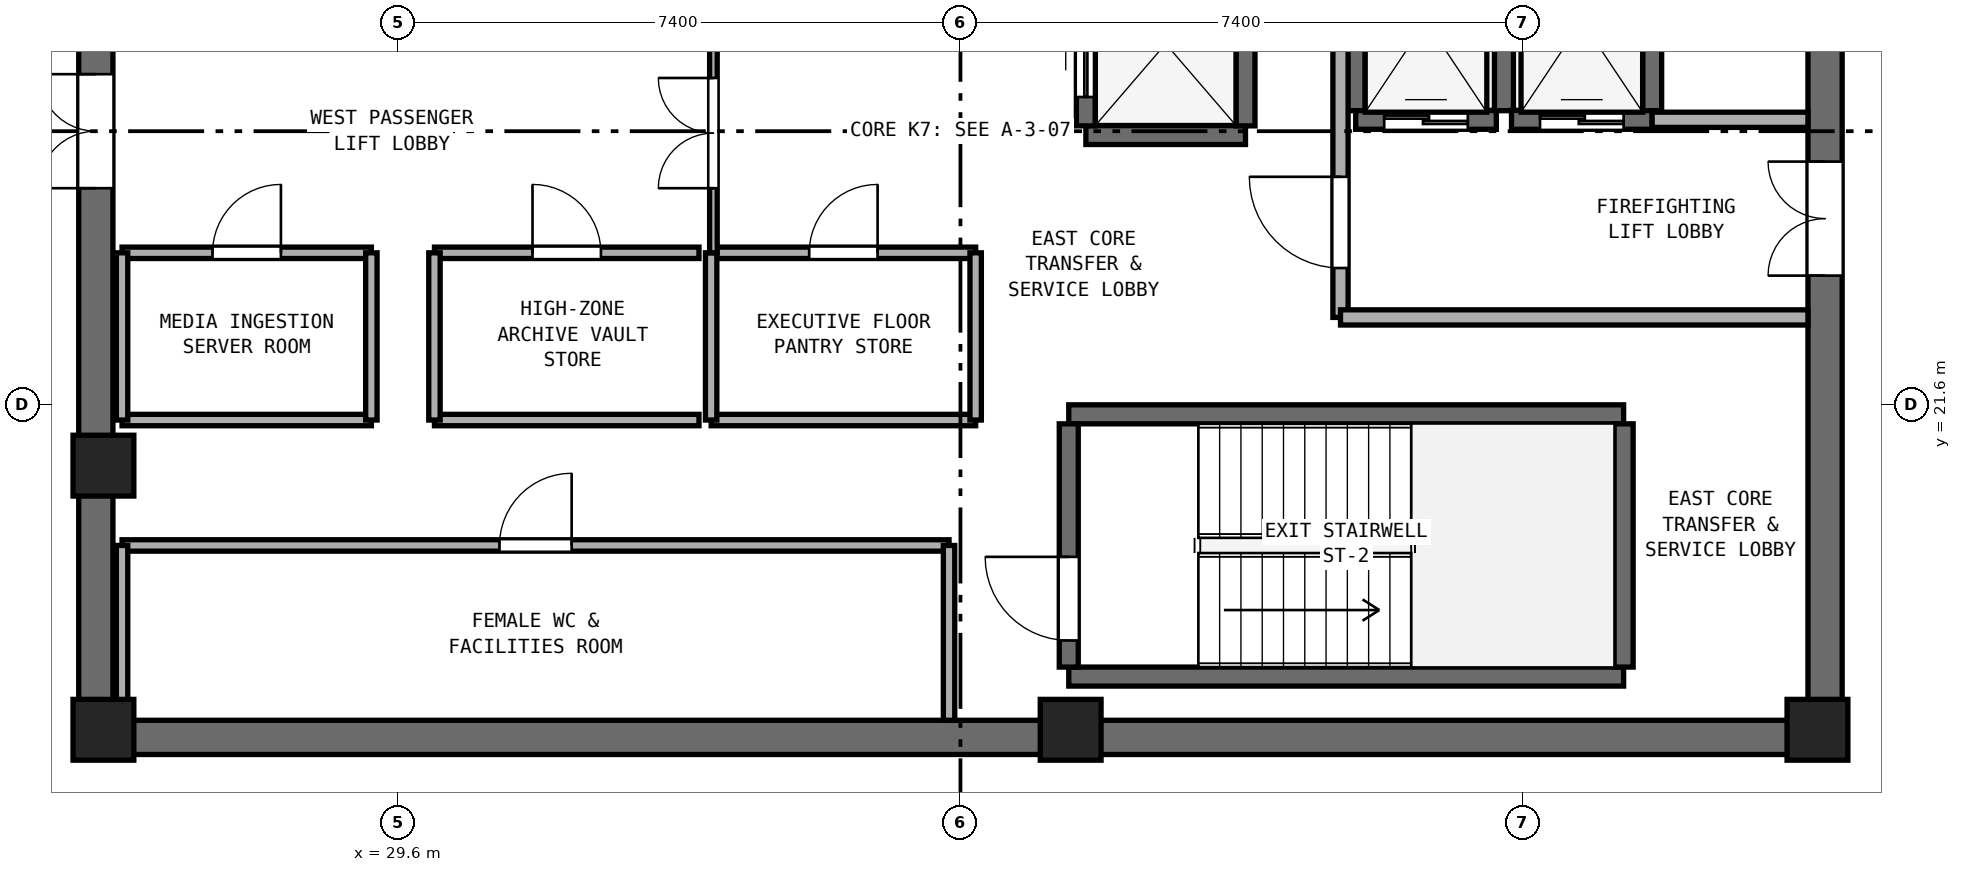
"""IFC4 building model, lengths in metres.
Left out: names, types, materials, properties, quantities, classifications, styles, units other than length and angle.
Written with IfcOpenShell. Run it as: python <this file> out.ifc"""

import sys

from ifc_helpers import new_model, si_unit, direction, frame, frame_2d, origin, origin_2d, place, context, subcontext, project, spatial, rectangle, extrude, element, fill, save


model = new_model("IFC4")
c1 = context("Model", 3, precision=1e-05, world=origin(), true_north=direction((0.0, 1.0)))
c2 = subcontext(c1, "Body", "Model", "MODEL_VIEW")
j1 = project(units=[si_unit("LENGTHUNIT", "METRE"), si_unit("PLANEANGLEUNIT", "RADIAN")], contexts=[c1])
p1 = place(None, origin())
s1 = spatial("IfcSite", under=j1, at=p1, CompositionType="ELEMENT")
p2 = place(p1, origin())
s2 = spatial("IfcBuilding", under=s1, at=p2, CompositionType="ELEMENT")
p3 = place(p2, frame((0.0, 0.0, 251.6)))
s3 = spatial("IfcBuildingStorey", under=s2, at=p3, CompositionType="ELEMENT", Elevation=251.6)
p4 = place(p3, frame((25.4, 17.225, 0.0), z_axis=(0.0, 0.0, 1.0), x_axis=(1.0, 0.0, 0.0)))
e1 = element("IfcWall", 1, at=p4, inside=s3, PredefinedType="SHEAR", context=c2, shape_type="SweptSolid", body=[
    extrude(rectangle(XDim=23.2, YDim=0.45, at=frame_2d((11.6, 0.0))), origin(), (0.0, 0.0, 1.0), 3.51),
])
p5 = place(p3, frame((25.625, 17.45, 0.0), z_axis=(0.0, 0.0, 1.0), x_axis=(0.0, 1.0, 0.0)))
e2 = element("IfcWall", 2, at=p5, inside=s3, PredefinedType="SHEAR", context=c2, shape_type="SweptSolid", body=[
    extrude(rectangle(XDim=15.5, YDim=0.45, at=frame_2d((7.75, 0.0))), origin(), (0.0, 0.0, 1.0), 3.51),
])
p6 = place(p5, frame((7.0, 0.0, 0.0)))
e3 = element("IfcOpeningElement", 3, at=p6, cuts=e2, PredefinedType="OPENING", context=c2, shape_type="SweptSolid", body=[
    extrude(rectangle(XDim=1.5, YDim=2.15, at=frame_2d((0.75, 1.075))), frame((0.0, 0.235, 0.0), z_axis=(0.0, -1.0, 0.0), x_axis=(1.0, 0.0, 0.0)), (0.0, 0.0, 1.0), 0.47),
])
p7 = place(p3, frame((48.375, 17.45, 0.0), z_axis=(0.0, 0.0, 1.0), x_axis=(0.0, 1.0, 0.0)))
e4 = element("IfcWall", 4, at=p7, inside=s3, PredefinedType="SHEAR", context=c2, shape_type="SweptSolid", body=[
    extrude(rectangle(XDim=15.5, YDim=0.45, at=frame_2d((7.75, 0.0))), origin(), (0.0, 0.0, 1.0), 3.51),
])
p8 = place(p7, frame((5.85, 0.0, 0.0)))
e5 = element("IfcOpeningElement", 5, at=p8, cuts=e4, PredefinedType="OPENING", context=c2, shape_type="SweptSolid", body=[
    extrude(rectangle(XDim=1.5, YDim=2.15, at=frame_2d((0.75, 1.075))), frame((0.0, 0.235, 0.0), z_axis=(0.0, -1.0, 0.0), x_axis=(1.0, 0.0, 0.0)), (0.0, 0.0, 1.0), 0.47),
])
for number, where, z_axis, x_axis in (
    (6, (25.725, 17.325, 0.0), (0.0, 0.0, 1.0), (1.0, 0.0, 0.0)),
    (7, (38.45, 17.325, 0.0), (0.0, 0.0, 1.0), (1.0, 0.0, 0.0)),
    (8, (48.275, 17.325, 0.0), (0.0, 0.0, 1.0), (1.0, 0.0, 0.0)),
    (9, (25.725, 20.8, 0.0), (0.0, 0.0, 1.0), (1.0, 0.0, 0.0)),
):
    element("IfcColumn", number, at=place(p3, frame(where, z_axis=z_axis, x_axis=x_axis)), inside=s3, PredefinedType="PILASTER", context=c2, shape_type="SweptSolid", body=[
        extrude(rectangle(XDim=0.8, YDim=0.8, at=origin_2d()), origin(), (0.0, 0.0, 1.0), 3.8),
    ])
for number, where, z_axis, x_axis in (
    (10, (38.425, 18.025, 0.0), (0.0, 0.0, 1.0), (1.0, 0.0, 0.0)),
    (11, (38.425, 21.475, 0.0), (0.0, 0.0, 1.0), (1.0, 0.0, 0.0)),
):
    element("IfcWall", number, at=place(p3, frame(where, z_axis=z_axis, x_axis=x_axis)), inside=s3, PredefinedType="SHEAR", context=c2, shape_type="SweptSolid", body=[
        extrude(rectangle(XDim=7.3, YDim=0.25, at=frame_2d((3.65, 0.0))), origin(), (0.0, 0.0, 1.0), 3.51),
    ])
p9 = place(p3, frame((38.425, 18.15, 0.0), z_axis=(0.0, 0.0, 1.0), x_axis=(0.0, 1.0, 0.0)))
e12 = element("IfcWall", 12, at=p9, inside=s3, PredefinedType="SHEAR", context=c2, shape_type="SweptSolid", body=[
    extrude(rectangle(XDim=3.2, YDim=0.25, at=frame_2d((1.6, 0.0))), origin(), (0.0, 0.0, 1.0), 3.51),
])
p10 = place(p9, frame((0.35, 0.0, 0.0)))
e13 = element("IfcOpeningElement", 13, at=p10, cuts=e12, PredefinedType="OPENING", context=c2, shape_type="SweptSolid", body=[
    extrude(rectangle(XDim=1.1, YDim=2.15, at=frame_2d((0.55, 1.075))), frame((0.0, 0.135, 0.0), z_axis=(0.0, -1.0, 0.0), x_axis=(1.0, 0.0, 0.0)), (0.0, 0.0, 1.0), 0.27),
])
p11 = place(p3, frame((45.725, 18.15, 0.0), z_axis=(0.0, 0.0, 1.0), x_axis=(0.0, 1.0, 0.0)))
e14 = element("IfcWall", 14, at=p11, inside=s3, PredefinedType="SHEAR", context=c2, shape_type="SweptSolid", body=[
    extrude(rectangle(XDim=3.2, YDim=0.25, at=frame_2d((1.6, 0.0))), origin(), (0.0, 0.0, 1.0), 3.51),
])
p12 = place(p3, frame((42.2, 25.35, 0.0), z_axis=(0.0, 0.0, 1.0), x_axis=(1.0, 0.0, 0.0)))
e15 = element("IfcWall", 15, at=p12, inside=s3, PredefinedType="SHEAR", context=c2, shape_type="SweptSolid", body=[
    extrude(rectangle(XDim=1.85, YDim=0.25, at=frame_2d((0.925, 0.0))), origin(), (0.0, 0.0, 1.0), 3.51),
])
p13 = place(p12, frame((0.375, 0.0, 0.0)))
e16 = element("IfcOpeningElement", 16, at=p13, cuts=e15, PredefinedType="OPENING", context=c2, shape_type="SweptSolid", body=[
    extrude(rectangle(XDim=1.1, YDim=2.15, at=frame_2d((0.55, 1.075))), frame((0.0, 0.135, 0.0), z_axis=(0.0, -1.0, 0.0), x_axis=(1.0, 0.0, 0.0)), (0.0, 0.0, 1.0), 0.27),
])
for number, where, z_axis, x_axis in (
    (17, (42.2, 25.47, 0.0), (0.0, 0.0, 1.0), (0.0, 1.0, 0.0)),
    (18, (44.15, 25.47, 0.0), (0.0, 0.0, 1.0), (0.0, 1.0, 0.0)),
):
    element("IfcWall", number, at=place(p3, frame(where, z_axis=z_axis, x_axis=x_axis)), inside=s3, PredefinedType="SHEAR", context=c2, shape_type="SweptSolid", body=[
        extrude(rectangle(XDim=2.36, YDim=0.25, at=frame_2d((1.18, 0.0))), origin(), (0.0, 0.0, 1.0), 3.51),
    ])
p14 = place(p3, frame((44.25, 25.35, 0.0), z_axis=(0.0, 0.0, 1.0), x_axis=(1.0, 0.0, 0.0)))
e19 = element("IfcWall", 19, at=p14, inside=s3, PredefinedType="SHEAR", context=c2, shape_type="SweptSolid", body=[
    extrude(rectangle(XDim=1.85, YDim=0.25, at=frame_2d((0.925, 0.0))), origin(), (0.0, 0.0, 1.0), 3.51),
])
p15 = place(p14, frame((0.375, 0.0, 0.0)))
e20 = element("IfcOpeningElement", 20, at=p15, cuts=e19, PredefinedType="OPENING", context=c2, shape_type="SweptSolid", body=[
    extrude(rectangle(XDim=1.1, YDim=2.15, at=frame_2d((0.55, 1.075))), frame((0.0, 0.135, 0.0), z_axis=(0.0, -1.0, 0.0), x_axis=(1.0, 0.0, 0.0)), (0.0, 0.0, 1.0), 0.27),
])
p16 = place(p3, frame((46.1, 25.47, 0.0), z_axis=(0.0, 0.0, 1.0), x_axis=(0.0, 1.0, 0.0)))
e21 = element("IfcWall", 21, at=p16, inside=s3, PredefinedType="SHEAR", context=c2, shape_type="SweptSolid", body=[
    extrude(rectangle(XDim=2.36, YDim=0.25, at=frame_2d((1.18, 0.0))), origin(), (0.0, 0.0, 1.0), 3.51),
])
p17 = place(p3, frame((38.65, 25.15, 0.0), z_axis=(0.0, 0.0, 1.0), x_axis=(1.0, 0.0, 0.0)))
e22 = element("IfcWall", 22, at=p17, inside=s3, PredefinedType="SHEAR", context=c2, shape_type="SweptSolid", body=[
    extrude(rectangle(XDim=2.1, YDim=0.25, at=frame_2d((1.05, 0.0))), origin(), (0.0, 0.0, 1.0), 3.51),
])
p18 = place(p3, frame((38.65, 25.27, 0.0), z_axis=(0.0, 0.0, 1.0), x_axis=(0.0, 1.0, 0.0)))
e23 = element("IfcWall", 23, at=p18, inside=s3, PredefinedType="SHEAR", context=c2, shape_type="SweptSolid", body=[
    extrude(rectangle(XDim=2.16, YDim=0.25, at=frame_2d((1.08, 0.0))), origin(), (0.0, 0.0, 1.0), 3.51),
])
p19 = place(p18, frame((0.38, 0.0, 0.0)))
e24 = element("IfcOpeningElement", 24, at=p19, cuts=e23, PredefinedType="OPENING", context=c2, shape_type="SweptSolid", body=[
    extrude(rectangle(XDim=1.4, YDim=2.2, at=frame_2d((0.7, 1.1))), frame((0.0, 0.135, 0.0), z_axis=(0.0, -1.0, 0.0), x_axis=(1.0, 0.0, 0.0)), (0.0, 0.0, 1.0), 0.27),
])
p20 = place(p3, frame((40.75, 25.27, 0.0), z_axis=(0.0, 0.0, 1.0), x_axis=(0.0, 1.0, 0.0)))
e25 = element("IfcWall", 25, at=p20, inside=s3, PredefinedType="SHEAR", context=c2, shape_type="SweptSolid", body=[
    extrude(rectangle(XDim=2.16, YDim=0.25, at=frame_2d((1.08, 0.0))), origin(), (0.0, 0.0, 1.0), 3.51),
])
p21 = place(p3, frame((42.0, 22.75, 0.0), z_axis=(0.0, 0.0, 1.0), x_axis=(0.0, 1.0, 0.0)))
e26 = element("IfcWall", 26, at=p21, inside=s3, PredefinedType="SOLIDWALL", context=c2, shape_type="SweptSolid", body=[
    extrude(rectangle(XDim=6.05, YDim=0.2, at=frame_2d((3.025, 0.0))), origin(), (0.0, 0.0, 1.0), 3.51),
])
p22 = place(p21, frame((0.65, 0.0, 0.0)))
e27 = element("IfcOpeningElement", 27, at=p22, cuts=e26, PredefinedType="OPENING", context=c2, shape_type="SweptSolid", body=[
    extrude(rectangle(XDim=1.2, YDim=2.15, at=frame_2d((0.6, 1.075))), frame((0.0, 0.11, 0.0), z_axis=(0.0, -1.0, 0.0), x_axis=(1.0, 0.0, 0.0)), (0.0, 0.0, 1.0), 0.22),
])
p23 = place(p3, frame((42.0, 22.75, 0.0), z_axis=(0.0, 0.0, 1.0), x_axis=(1.0, 0.0, 0.0)))
e28 = element("IfcWall", 28, at=p23, inside=s3, PredefinedType="SOLIDWALL", context=c2, shape_type="SweptSolid", body=[
    extrude(rectangle(XDim=6.15, YDim=0.2, at=frame_2d((3.075, 0.0))), origin(), (0.0, 0.0, 1.0), 3.51),
])
p24 = place(p3, frame((46.1, 25.35, 0.0), z_axis=(0.0, 0.0, 1.0), x_axis=(1.0, 0.0, 0.0)))
e29 = element("IfcWall", 29, at=p24, inside=s3, PredefinedType="SOLIDWALL", context=c2, shape_type="SweptSolid", body=[
    extrude(rectangle(XDim=2.05, YDim=0.2, at=frame_2d((1.025, 0.0))), origin(), (0.0, 0.0, 1.0), 3.51),
])
p25 = place(p3, frame((25.97, 19.75, 0.0), z_axis=(0.0, 0.0, 1.0), x_axis=(1.0, 0.0, 0.0)))
e30 = element("IfcWall", 30, at=p25, inside=s3, PredefinedType="PARTITIONING", context=c2, shape_type="SweptSolid", body=[
    extrude(rectangle(XDim=10.88, YDim=0.15, at=frame_2d((5.44, 0.0))), origin(), (0.0, 0.0, 1.0), 3.51),
])
p26 = place(p25, frame((4.965, 0.0, 0.0)))
e31 = element("IfcOpeningElement", 31, at=p26, cuts=e30, PredefinedType="OPENING", context=c2, shape_type="SweptSolid", body=[
    extrude(rectangle(XDim=0.95, YDim=2.1, at=frame_2d((0.475, 1.05))), frame((0.0, 0.085, 0.0), z_axis=(0.0, -1.0, 0.0), x_axis=(1.0, 0.0, 0.0)), (0.0, 0.0, 1.0), 0.17),
])
p27 = place(p3, frame((25.97, 17.45, 0.0), z_axis=(0.0, 0.0, 1.0), x_axis=(0.0, 1.0, 0.0)))
e32 = element("IfcWall", 32, at=p27, inside=s3, PredefinedType="PARTITIONING", context=c2, shape_type="SweptSolid", body=[
    extrude(rectangle(XDim=2.3, YDim=0.15, at=frame_2d((1.15, 0.0))), origin(), (0.0, 0.0, 1.0), 2.61),
])
p28 = place(p3, frame((36.85, 17.45, 0.0), z_axis=(0.0, 0.0, 1.0), x_axis=(0.0, 1.0, 0.0)))
e33 = element("IfcWall", 33, at=p28, inside=s3, PredefinedType="PARTITIONING", context=c2, shape_type="SweptSolid", body=[
    extrude(rectangle(XDim=2.3, YDim=0.15, at=frame_2d((1.15, 0.0))), origin(), (0.0, 0.0, 1.0), 3.51),
])
p29 = place(p3, frame((25.97, 21.4, 0.0), z_axis=(0.0, 0.0, 1.0), x_axis=(1.0, 0.0, 0.0)))
e34 = element("IfcWall", 34, at=p29, inside=s3, PredefinedType="PARTITIONING", context=c2, shape_type="SweptSolid", body=[
    extrude(rectangle(XDim=3.28, YDim=0.15, at=frame_2d((1.64, 0.0))), origin(), (0.0, 0.0, 1.0), 3.51),
])
p30 = place(p3, frame((25.97, 23.6, 0.0), z_axis=(0.0, 0.0, 1.0), x_axis=(1.0, 0.0, 0.0)))
e35 = element("IfcWall", 35, at=p30, inside=s3, PredefinedType="PARTITIONING", context=c2, shape_type="SweptSolid", body=[
    extrude(rectangle(XDim=3.28, YDim=0.15, at=frame_2d((1.64, 0.0))), origin(), (0.0, 0.0, 1.0), 3.51),
])
p31 = place(p30, frame((1.19, 0.0, 0.0)))
e36 = element("IfcOpeningElement", 36, at=p31, cuts=e35, PredefinedType="OPENING", context=c2, shape_type="SweptSolid", body=[
    extrude(rectangle(XDim=0.9, YDim=2.1, at=frame_2d((0.45, 1.05))), frame((0.0, 0.085, 0.0), z_axis=(0.0, -1.0, 0.0), x_axis=(1.0, 0.0, 0.0)), (0.0, 0.0, 1.0), 0.17),
])
p32 = place(p3, frame((25.97, 21.4, 0.0), z_axis=(0.0, 0.0, 1.0), x_axis=(0.0, 1.0, 0.0)))
e37 = element("IfcWall", 37, at=p32, inside=s3, PredefinedType="PARTITIONING", context=c2, shape_type="SweptSolid", body=[
    extrude(rectangle(XDim=2.2, YDim=0.15, at=frame_2d((1.1, 0.0))), origin(), (0.0, 0.0, 1.0), 2.61),
])
p33 = place(p3, frame((29.25, 21.4, 0.0), z_axis=(0.0, 0.0, 1.0), x_axis=(0.0, 1.0, 0.0)))
e38 = element("IfcWall", 38, at=p33, inside=s3, PredefinedType="PARTITIONING", context=c2, shape_type="SweptSolid", body=[
    extrude(rectangle(XDim=2.2, YDim=0.15, at=frame_2d((1.1, 0.0))), origin(), (0.0, 0.0, 1.0), 3.51),
])
p34 = place(p3, frame((30.08, 21.4, 0.0), z_axis=(0.0, 0.0, 1.0), x_axis=(1.0, 0.0, 0.0)))
e39 = element("IfcWall", 39, at=p34, inside=s3, PredefinedType="PARTITIONING", context=c2, shape_type="SweptSolid", body=[
    extrude(rectangle(XDim=3.48, YDim=0.15, at=frame_2d((1.74, 0.0))), origin(), (0.0, 0.0, 1.0), 3.51),
])
p35 = place(p3, frame((30.08, 23.6, 0.0), z_axis=(0.0, 0.0, 1.0), x_axis=(1.0, 0.0, 0.0)))
e40 = element("IfcWall", 40, at=p35, inside=s3, PredefinedType="PARTITIONING", context=c2, shape_type="SweptSolid", body=[
    extrude(rectangle(XDim=3.48, YDim=0.15, at=frame_2d((1.74, 0.0))), origin(), (0.0, 0.0, 1.0), 3.51),
])
p36 = place(p35, frame((1.29, 0.0, 0.0)))
e41 = element("IfcOpeningElement", 41, at=p36, cuts=e40, PredefinedType="OPENING", context=c2, shape_type="SweptSolid", body=[
    extrude(rectangle(XDim=0.9, YDim=2.1, at=frame_2d((0.45, 1.05))), frame((0.0, 0.085, 0.0), z_axis=(0.0, -1.0, 0.0), x_axis=(1.0, 0.0, 0.0)), (0.0, 0.0, 1.0), 0.17),
])
p37 = place(p3, frame((30.08, 21.4, 0.0), z_axis=(0.0, 0.0, 1.0), x_axis=(0.0, 1.0, 0.0)))
e42 = element("IfcWall", 42, at=p37, inside=s3, PredefinedType="PARTITIONING", context=c2, shape_type="SweptSolid", body=[
    extrude(rectangle(XDim=2.2, YDim=0.15, at=frame_2d((1.1, 0.0))), origin(), (0.0, 0.0, 1.0), 3.51),
])
p38 = place(p3, frame((33.72, 21.4, 0.0), z_axis=(0.0, 0.0, 1.0), x_axis=(1.0, 0.0, 0.0)))
e43 = element("IfcWall", 43, at=p38, inside=s3, PredefinedType="PARTITIONING", context=c2, shape_type="SweptSolid", body=[
    extrude(rectangle(XDim=3.48, YDim=0.15, at=frame_2d((1.74, 0.0))), origin(), (0.0, 0.0, 1.0), 3.51),
])
p39 = place(p3, frame((33.72, 23.6, 0.0), z_axis=(0.0, 0.0, 1.0), x_axis=(1.0, 0.0, 0.0)))
e44 = element("IfcWall", 44, at=p39, inside=s3, PredefinedType="PARTITIONING", context=c2, shape_type="SweptSolid", body=[
    extrude(rectangle(XDim=3.48, YDim=0.15, at=frame_2d((1.74, 0.0))), origin(), (0.0, 0.0, 1.0), 3.51),
])
p40 = place(p39, frame((1.29, 0.0, 0.0)))
e45 = element("IfcOpeningElement", 45, at=p40, cuts=e44, PredefinedType="OPENING", context=c2, shape_type="SweptSolid", body=[
    extrude(rectangle(XDim=0.9, YDim=2.1, at=frame_2d((0.45, 1.05))), frame((0.0, 0.085, 0.0), z_axis=(0.0, -1.0, 0.0), x_axis=(1.0, 0.0, 0.0)), (0.0, 0.0, 1.0), 0.17),
])
for number, where, z_axis, x_axis in (
    (46, (33.72, 21.4, 0.0), (0.0, 0.0, 1.0), (0.0, 1.0, 0.0)),
    (47, (37.2, 21.4, 0.0), (0.0, 0.0, 1.0), (0.0, 1.0, 0.0)),
):
    element("IfcWall", number, at=place(p3, frame(where, z_axis=z_axis, x_axis=x_axis)), inside=s3, PredefinedType="PARTITIONING", context=c2, shape_type="SweptSolid", body=[
        extrude(rectangle(XDim=2.2, YDim=0.15, at=frame_2d((1.1, 0.0))), origin(), (0.0, 0.0, 1.0), 3.51),
    ])
p41 = place(p3, frame((33.75, 23.6, 0.0), z_axis=(0.0, 0.0, 1.0), x_axis=(0.0, 1.0, 0.0)))
e48 = element("IfcWall", 48, at=p41, inside=s3, PredefinedType="PARTITIONING", context=c2, shape_type="SweptSolid", body=[
    extrude(rectangle(XDim=3.2, YDim=0.1, at=frame_2d((1.6, 0.0))), origin(), (0.0, 0.0, 1.0), 3.51),
])
p42 = place(p41, frame((0.85, 0.0, 0.0)))
e49 = element("IfcOpeningElement", 49, at=p42, cuts=e48, PredefinedType="OPENING", context=c2, shape_type="SweptSolid", body=[
    extrude(rectangle(XDim=1.45, YDim=2.12, at=frame_2d((0.725, 1.06))), frame((0.0, 0.06, 0.0), z_axis=(0.0, -1.0, 0.0), x_axis=(1.0, 0.0, 0.0)), (0.0, 0.0, 1.0), 0.12),
])
p43 = place(p10, origin())
e50 = element("IfcDoor", 50, at=p43, inside=s3, OperationType="SINGLE_SWING_RIGHT", PredefinedType="DOOR", context=c2, shape_type="SweptSolid", body=[
    extrude(rectangle(XDim=1.1, YDim=2.15, at=frame_2d((0.55, 1.075))), frame((0.0, 0.025, 0.0), z_axis=(0.0, -1.0, 0.0), x_axis=(1.0, 0.0, 0.0)), (0.0, 0.0, 1.0), 0.05),
])
fill(e13, e50)
p44 = place(p13, origin())
e51 = element("IfcDoor", 51, at=p44, inside=s3, OperationType="DOUBLE_DOOR_SLIDING", PredefinedType="DOOR", context=c2, shape_type="SweptSolid", body=[
    extrude(rectangle(XDim=1.1, YDim=2.15, at=frame_2d((0.55, 1.075))), frame((0.0, 0.025, 0.0), z_axis=(0.0, -1.0, 0.0), x_axis=(1.0, 0.0, 0.0)), (0.0, 0.0, 1.0), 0.05),
])
fill(e16, e51)
p45 = place(p15, origin())
e52 = element("IfcDoor", 52, at=p45, inside=s3, OperationType="DOUBLE_DOOR_SLIDING", PredefinedType="DOOR", context=c2, shape_type="SweptSolid", body=[
    extrude(rectangle(XDim=1.1, YDim=2.15, at=frame_2d((0.55, 1.075))), frame((0.0, 0.025, 0.0), z_axis=(0.0, -1.0, 0.0), x_axis=(1.0, 0.0, 0.0)), (0.0, 0.0, 1.0), 0.05),
])
fill(e20, e52)
p46 = place(p19, origin())
e53 = element("IfcDoor", 53, at=p46, inside=s3, OperationType="DOUBLE_DOOR_SLIDING", PredefinedType="DOOR", context=c2, shape_type="SweptSolid", body=[
    extrude(rectangle(XDim=1.4, YDim=2.2, at=frame_2d((0.7, 1.1))), frame((0.0, 0.025, 0.0), z_axis=(0.0, -1.0, 0.0), x_axis=(1.0, 0.0, 0.0)), (0.0, 0.0, 1.0), 0.05),
])
fill(e24, e53)
p47 = place(p22, origin())
e54 = element("IfcDoor", 54, at=p47, inside=s3, OperationType="SINGLE_SWING_RIGHT", PredefinedType="DOOR", context=c2, shape_type="SweptSolid", body=[
    extrude(rectangle(XDim=1.2, YDim=2.15, at=frame_2d((0.6, 1.075))), frame((0.0, 0.025, 0.0), z_axis=(0.0, -1.0, 0.0), x_axis=(1.0, 0.0, 0.0)), (0.0, 0.0, 1.0), 0.05),
])
fill(e27, e54)
p48 = place(p6, origin())
e55 = element("IfcDoor", 55, at=p48, inside=s3, OperationType="DOUBLE_DOOR_SINGLE_SWING", PredefinedType="DOOR", context=c2, shape_type="SweptSolid", body=[
    extrude(rectangle(XDim=1.5, YDim=2.15, at=frame_2d((0.75, 1.075))), frame((0.0, 0.025, 0.0), z_axis=(0.0, -1.0, 0.0), x_axis=(1.0, 0.0, 0.0)), (0.0, 0.0, 1.0), 0.05),
])
fill(e3, e55)
p49 = place(p8, origin())
e56 = element("IfcDoor", 56, at=p49, inside=s3, OperationType="DOUBLE_DOOR_SINGLE_SWING", PredefinedType="DOOR", context=c2, shape_type="SweptSolid", body=[
    extrude(rectangle(XDim=1.5, YDim=2.15, at=frame_2d((0.75, 1.075))), frame((0.0, 0.025, 0.0), z_axis=(0.0, -1.0, 0.0), x_axis=(1.0, 0.0, 0.0)), (0.0, 0.0, 1.0), 0.05),
])
fill(e5, e56)
p50 = place(p26, origin())
e57 = element("IfcDoor", 57, at=p50, inside=s3, OperationType="SINGLE_SWING_RIGHT", PredefinedType="DOOR", context=c2, shape_type="SweptSolid", body=[
    extrude(rectangle(XDim=0.95, YDim=2.1, at=frame_2d((0.475, 1.05))), frame((0.0, 0.025, 0.0), z_axis=(0.0, -1.0, 0.0), x_axis=(1.0, 0.0, 0.0)), (0.0, 0.0, 1.0), 0.05),
])
fill(e31, e57)
p51 = place(p31, origin())
e58 = element("IfcDoor", 58, at=p51, inside=s3, OperationType="SINGLE_SWING_RIGHT", PredefinedType="DOOR", context=c2, shape_type="SweptSolid", body=[
    extrude(rectangle(XDim=0.9, YDim=2.1, at=frame_2d((0.45, 1.05))), frame((0.0, 0.025, 0.0), z_axis=(0.0, -1.0, 0.0), x_axis=(1.0, 0.0, 0.0)), (0.0, 0.0, 1.0), 0.05),
])
fill(e36, e58)
p52 = place(p36, origin())
e59 = element("IfcDoor", 59, at=p52, inside=s3, OperationType="SINGLE_SWING_LEFT", PredefinedType="DOOR", context=c2, shape_type="SweptSolid", body=[
    extrude(rectangle(XDim=0.9, YDim=2.1, at=frame_2d((0.45, 1.05))), frame((0.0, 0.025, 0.0), z_axis=(0.0, -1.0, 0.0), x_axis=(1.0, 0.0, 0.0)), (0.0, 0.0, 1.0), 0.05),
])
fill(e41, e59)
p53 = place(p40, origin())
e60 = element("IfcDoor", 60, at=p53, inside=s3, OperationType="SINGLE_SWING_RIGHT", PredefinedType="DOOR", context=c2, shape_type="SweptSolid", body=[
    extrude(rectangle(XDim=0.9, YDim=2.1, at=frame_2d((0.45, 1.05))), frame((0.0, 0.025, 0.0), z_axis=(0.0, -1.0, 0.0), x_axis=(1.0, 0.0, 0.0)), (0.0, 0.0, 1.0), 0.05),
])
fill(e45, e60)
p54 = place(p42, origin())
e61 = element("IfcDoor", 61, at=p54, inside=s3, OperationType="DOUBLE_DOOR_SINGLE_SWING", PredefinedType="DOOR", context=c2, shape_type="SweptSolid", body=[
    extrude(rectangle(XDim=1.45, YDim=2.12, at=frame_2d((0.725, 1.06))), frame((0.0, 0.025, 0.0), z_axis=(0.0, -1.0, 0.0), x_axis=(1.0, 0.0, 0.0)), (0.0, 0.0, 1.0), 0.05),
])
fill(e49, e61)
save(model, sys.argv[1])
